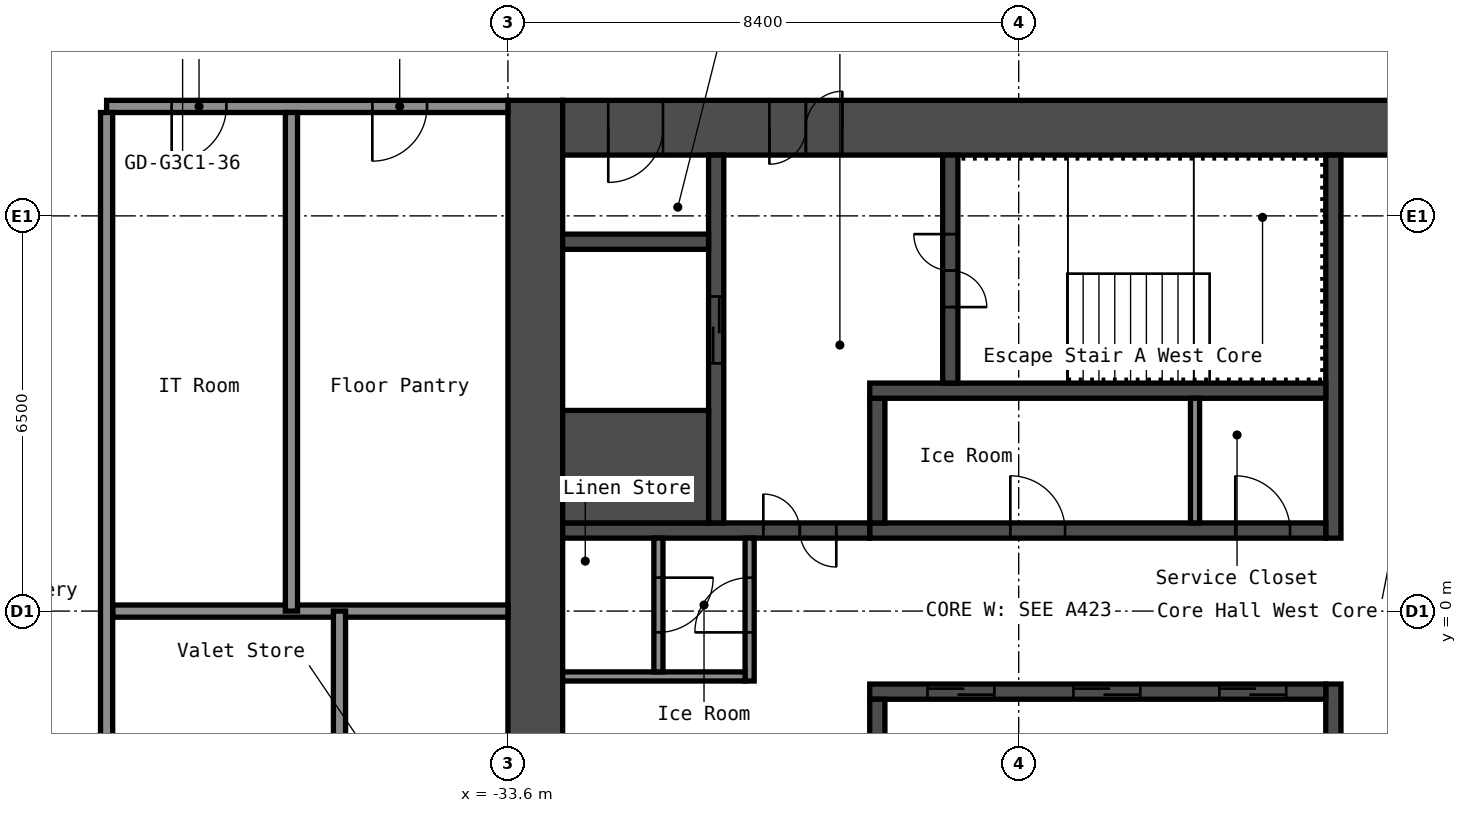
"""IFC4 building model, lengths in metres.
Left out: names, types, materials, properties, quantities, classifications, styles, units other than length and angle.
Written with IfcOpenShell. Run it as: python <this file> out.ifc"""

import sys

from ifc_helpers import new_model, si_unit, direction, frame, frame_2d, origin, place, context, subcontext, project, spatial, rectangle, extrude, element, fill, save


model = new_model("IFC4")
c1 = context("Model", 3, precision=1e-05, world=origin(), true_north=direction((0.0, 1.0)))
c2 = subcontext(c1, "Body", "Model", "MODEL_VIEW")
j1 = project(units=[si_unit("LENGTHUNIT", "METRE"), si_unit("PLANEANGLEUNIT", "RADIAN")], contexts=[c1])
p1 = place(None, origin())
s1 = spatial("IfcSite", under=j1, at=p1, CompositionType="ELEMENT")
p2 = place(p1, origin())
s2 = spatial("IfcBuilding", under=s1, at=p2, CompositionType="ELEMENT")
p3 = place(p2, frame((0.0, 0.0, 153.4)))
s3 = spatial("IfcBuildingStorey", under=s2, at=p3, CompositionType="ELEMENT", Elevation=153.4)
p4 = place(p3, frame((-33.15, -8.4, 0.0), z_axis=(0.0, 0.0, 1.0), x_axis=(0.0, 1.0, 0.0)))
e1 = element("IfcWall", 1, at=p4, inside=s3, PredefinedType="SHEAR", context=c2, shape_type="SweptSolid", body=[
    extrude(rectangle(XDim=16.8, YDim=0.9, at=frame_2d((8.4, 0.0))), origin(), (0.0, 0.0, 1.0), 2.75),
])
p5 = place(p3, frame((-32.7, 7.95, 0.0), z_axis=(0.0, 0.0, 1.0), x_axis=(1.0, 0.0, 0.0)))
e2 = element("IfcWall", 2, at=p5, inside=s3, PredefinedType="SHEAR", context=c2, shape_type="SweptSolid", body=[
    extrude(rectangle(XDim=15.0, YDim=0.9, at=frame_2d((7.5, 0.0))), origin(), (0.0, 0.0, 1.0), 2.75),
])
p6 = place(p5, frame((3.4, 0.0, 0.0)))
e3 = element("IfcOpeningElement", 3, at=p6, cuts=e2, PredefinedType="OPENING", context=c2, shape_type="SweptSolid", body=[
    extrude(rectangle(XDim=1.2, YDim=2.1, at=frame_2d((0.6, 1.05))), frame((0.0, 0.46, 0.0), z_axis=(0.0, -1.0, 0.0), x_axis=(1.0, 0.0, 0.0)), (0.0, 0.0, 1.0), 0.92),
])
p7 = place(p5, frame((0.75, 0.0, 0.0)))
e4 = element("IfcOpeningElement", 4, at=p7, cuts=e2, PredefinedType="OPENING", context=c2, shape_type="SweptSolid", body=[
    extrude(rectangle(XDim=0.9, YDim=2.1, at=frame_2d((0.45, 1.05))), frame((0.0, 0.46, 0.0), z_axis=(0.0, -1.0, 0.0), x_axis=(1.0, 0.0, 0.0)), (0.0, 0.0, 1.0), 0.92),
])
p8 = place(p3, frame((-20.025, 1.2, 0.0), z_axis=(0.0, 0.0, 1.0), x_axis=(0.0, 1.0, 0.0)))
e5 = element("IfcWall", 5, at=p8, inside=s3, PredefinedType="SHEAR", context=c2, shape_type="SweptSolid", body=[
    extrude(rectangle(XDim=6.3, YDim=0.25, at=frame_2d((3.15, 0.0))), origin(), (0.0, 0.0, 1.0), 2.75),
])
p9 = place(p3, frame((-20.025, -7.5, 0.0), z_axis=(0.0, 0.0, 1.0), x_axis=(0.0, 1.0, 0.0)))
e6 = element("IfcWall", 6, at=p9, inside=s3, PredefinedType="SHEAR", context=c2, shape_type="SweptSolid", body=[
    extrude(rectangle(XDim=6.3, YDim=0.25, at=frame_2d((3.15, 0.0))), origin(), (0.0, 0.0, 1.0), 2.75),
])
p10 = place(p9, frame((2.4, 0.0, 0.0)))
e7 = element("IfcOpeningElement", 7, at=p10, cuts=e6, PredefinedType="OPENING", context=c2, shape_type="SweptSolid", body=[
    extrude(rectangle(XDim=1.0, YDim=2.1, at=frame_2d((0.5, 1.05))), frame((0.0, 0.135, 0.0), z_axis=(0.0, -1.0, 0.0), x_axis=(1.0, 0.0, 0.0)), (0.0, 0.0, 1.0), 0.27),
])
p11 = place(p3, frame((-27.65, 1.325, 0.0), z_axis=(0.0, 0.0, 1.0), x_axis=(1.0, 0.0, 0.0)))
e8 = element("IfcWall", 8, at=p11, inside=s3, PredefinedType="SHEAR", context=c2, shape_type="SweptSolid", body=[
    extrude(rectangle(XDim=7.5, YDim=0.25, at=frame_2d((3.75, 0.0))), origin(), (0.0, 0.0, 1.0), 2.75),
])
p12 = place(p11, frame((6.012, 0.0, 0.0)))
e9 = element("IfcOpeningElement", 9, at=p12, cuts=e8, PredefinedType="OPENING", context=c2, shape_type="SweptSolid", body=[
    extrude(rectangle(XDim=0.9, YDim=2.1, at=frame_2d((0.45, 1.05))), frame((0.0, 0.135, 0.0), z_axis=(0.0, -1.0, 0.0), x_axis=(1.0, 0.0, 0.0)), (0.0, 0.0, 1.0), 0.27),
])
p13 = place(p11, frame((2.312, 0.0, 0.0)))
e10 = element("IfcOpeningElement", 10, at=p13, cuts=e8, PredefinedType="OPENING", context=c2, shape_type="SweptSolid", body=[
    extrude(rectangle(XDim=0.9, YDim=2.1, at=frame_2d((0.45, 1.05))), frame((0.0, 0.135, 0.0), z_axis=(0.0, -1.0, 0.0), x_axis=(1.0, 0.0, 0.0)), (0.0, 0.0, 1.0), 0.27),
])
p14 = place(p3, frame((-27.525, 1.45, 0.0), z_axis=(0.0, 0.0, 1.0), x_axis=(0.0, 1.0, 0.0)))
e11 = element("IfcWall", 11, at=p14, inside=s3, PredefinedType="SHEAR", context=c2, shape_type="SweptSolid", body=[
    extrude(rectangle(XDim=2.05, YDim=0.25, at=frame_2d((1.025, 0.0))), origin(), (0.0, 0.0, 1.0), 2.75),
])
p15 = place(p3, frame((-27.65, 3.625, 0.0), z_axis=(0.0, 0.0, 1.0), x_axis=(1.0, 0.0, 0.0)))
e12 = element("IfcWall", 12, at=p15, inside=s3, PredefinedType="SHEAR", context=c2, shape_type="SweptSolid", body=[
    extrude(rectangle(XDim=7.5, YDim=0.25, at=frame_2d((3.75, 0.0))), origin(), (0.0, 0.0, 1.0), 2.75),
])
p16 = place(p3, frame((-26.325, 3.75, 0.0), z_axis=(0.0, 0.0, 1.0), x_axis=(0.0, 1.0, 0.0)))
e13 = element("IfcWall", 13, at=p16, inside=s3, PredefinedType="SHEAR", context=c2, shape_type="SweptSolid", body=[
    extrude(rectangle(XDim=3.75, YDim=0.25, at=frame_2d((1.875, 0.0))), origin(), (0.0, 0.0, 1.0), 2.75),
])
p17 = place(p16, frame((1.25, 0.0, 0.0)))
e14 = element("IfcOpeningElement", 14, at=p17, cuts=e13, PredefinedType="OPENING", context=c2, shape_type="SweptSolid", body=[
    extrude(rectangle(XDim=1.2, YDim=2.1, at=frame_2d((0.6, 1.05))), frame((0.0, 0.135, 0.0), z_axis=(0.0, -1.0, 0.0), x_axis=(1.0, 0.0, 0.0)), (0.0, 0.0, 1.0), 0.27),
])
p18 = place(p3, frame((-32.7, 1.325, 0.0), z_axis=(0.0, 0.0, 1.0), x_axis=(1.0, 0.0, 0.0)))
e15 = element("IfcWall", 15, at=p18, inside=s3, PredefinedType="SHEAR", context=c2, shape_type="SweptSolid", body=[
    extrude(rectangle(XDim=5.05, YDim=0.25, at=frame_2d((2.525, 0.0))), origin(), (0.0, 0.0, 1.0), 2.75),
])
p19 = place(p18, frame((3.3, 0.0, 0.0)))
e16 = element("IfcOpeningElement", 16, at=p19, cuts=e15, PredefinedType="OPENING", context=c2, shape_type="SweptSolid", body=[
    extrude(rectangle(XDim=1.2, YDim=2.1, at=frame_2d((0.6, 1.05))), frame((0.0, 0.135, 0.0), z_axis=(0.0, -1.0, 0.0), x_axis=(1.0, 0.0, 0.0)), (0.0, 0.0, 1.0), 0.27),
])
p20 = place(p3, frame((-30.175, 1.45, 0.0), z_axis=(0.0, 0.0, 1.0), x_axis=(0.0, 1.0, 0.0)))
e17 = element("IfcWall", 17, at=p20, inside=s3, PredefinedType="SHEAR", context=c2, shape_type="SweptSolid", body=[
    extrude(rectangle(XDim=6.05, YDim=0.25, at=frame_2d((3.025, 0.0))), origin(), (0.0, 0.0, 1.0), 2.75),
])
p21 = place(p20, frame((2.625, 0.0, 0.0)))
e18 = element("IfcOpeningElement", 18, at=p21, cuts=e17, PredefinedType="OPENING", context=c2, shape_type="SweptSolid", body=[
    extrude(rectangle(XDim=1.1, YDim=2.1, at=frame_2d((0.55, 1.05))), frame((0.0, 0.135, 0.0), z_axis=(0.0, -1.0, 0.0), x_axis=(1.0, 0.0, 0.0)), (0.0, 0.0, 1.0), 0.27),
])
p22 = place(p3, frame((-32.7, 2.375, 0.0), z_axis=(0.0, 0.0, 1.0), x_axis=(1.0, 0.0, 0.0)))
e19 = element("IfcWall", 19, at=p22, inside=s3, PredefinedType="SHEAR", context=c2, shape_type="SweptSolid", body=[
    extrude(rectangle(XDim=2.4, YDim=1.85, at=frame_2d((1.2, 0.0))), origin(), (0.0, 0.0, 1.0), 2.75),
])
p23 = place(p3, frame((-32.7, 6.075, 0.0), z_axis=(0.0, 0.0, 1.0), x_axis=(1.0, 0.0, 0.0)))
e20 = element("IfcWall", 20, at=p23, inside=s3, PredefinedType="SHEAR", context=c2, shape_type="SweptSolid", body=[
    extrude(rectangle(XDim=2.4, YDim=0.25, at=frame_2d((1.2, 0.0))), origin(), (0.0, 0.0, 1.0), 2.75),
])
p24 = place(p3, frame((-27.65, -1.325, 0.0), z_axis=(0.0, 0.0, 1.0), x_axis=(1.0, 0.0, 0.0)))
e21 = element("IfcWall", 21, at=p24, inside=s3, PredefinedType="SHEAR", context=c2, shape_type="SweptSolid", body=[
    extrude(rectangle(XDim=7.5, YDim=0.25, at=frame_2d((3.75, 0.0))), origin(), (0.0, 0.0, 1.0), 2.75),
])
p25 = place(p24, frame((5.75, 0.0, 0.0)))
e22 = element("IfcOpeningElement", 22, at=p25, cuts=e21, PredefinedType="OPENING", context=c2, shape_type="SweptSolid", body=[
    extrude(rectangle(XDim=1.1, YDim=2.1, at=frame_2d((0.55, 1.05))), frame((0.0, 0.135, 0.0), z_axis=(0.0, -1.0, 0.0), x_axis=(1.0, 0.0, 0.0)), (0.0, 0.0, 1.0), 0.27),
])
p26 = place(p24, frame((3.35, 0.0, 0.0)))
e23 = element("IfcOpeningElement", 23, at=p26, cuts=e21, PredefinedType="OPENING", context=c2, shape_type="SweptSolid", body=[
    extrude(rectangle(XDim=1.1, YDim=2.1, at=frame_2d((0.55, 1.05))), frame((0.0, 0.135, 0.0), z_axis=(0.0, -1.0, 0.0), x_axis=(1.0, 0.0, 0.0)), (0.0, 0.0, 1.0), 0.27),
])
p27 = place(p24, frame((0.95, 0.0, 0.0)))
e24 = element("IfcOpeningElement", 24, at=p27, cuts=e21, PredefinedType="OPENING", context=c2, shape_type="SweptSolid", body=[
    extrude(rectangle(XDim=1.1, YDim=2.1, at=frame_2d((0.55, 1.05))), frame((0.0, 0.135, 0.0), z_axis=(0.0, -1.0, 0.0), x_axis=(1.0, 0.0, 0.0)), (0.0, 0.0, 1.0), 0.27),
])
p28 = place(p3, frame((-27.525, -3.5, 0.0), z_axis=(0.0, 0.0, 1.0), x_axis=(0.0, 1.0, 0.0)))
e25 = element("IfcWall", 25, at=p28, inside=s3, PredefinedType="SHEAR", context=c2, shape_type="SweptSolid", body=[
    extrude(rectangle(XDim=2.05, YDim=0.25, at=frame_2d((1.025, 0.0))), origin(), (0.0, 0.0, 1.0), 2.75),
])
p29 = place(p3, frame((-29.625, -1.15, 0.0), z_axis=(0.0, 0.0, 1.0), x_axis=(0.0, 1.0, 0.0)))
e26 = element("IfcWall", 26, at=p29, inside=s3, PredefinedType="PARTITIONING", context=c2, shape_type="SweptSolid", body=[
    extrude(rectangle(XDim=2.35, YDim=0.15, at=frame_2d((1.175, 0.0))), origin(), (0.0, 0.0, 1.0), 2.75),
])
p30 = place(p29, frame((0.8, 0.0, 0.0)))
e27 = element("IfcOpeningElement", 27, at=p30, cuts=e26, PredefinedType="OPENING", context=c2, shape_type="SweptSolid", body=[
    extrude(rectangle(XDim=0.9, YDim=2.1, at=frame_2d((0.45, 1.05))), frame((0.0, 0.085, 0.0), z_axis=(0.0, -1.0, 0.0), x_axis=(1.0, 0.0, 0.0)), (0.0, 0.0, 1.0), 0.17),
])
p31 = place(p3, frame((-32.7, -1.075, 0.0), z_axis=(0.0, 0.0, 1.0), x_axis=(1.0, 0.0, 0.0)))
e28 = element("IfcWall", 28, at=p31, inside=s3, PredefinedType="PARTITIONING", context=c2, shape_type="SweptSolid", body=[
    extrude(rectangle(XDim=3.0, YDim=0.15, at=frame_2d((1.5, 0.0))), origin(), (0.0, 0.0, 1.0), 2.75),
])
p32 = place(p3, frame((-31.125, -1.0, 0.0), z_axis=(0.0, 0.0, 1.0), x_axis=(0.0, 1.0, 0.0)))
e29 = element("IfcWall", 29, at=p32, inside=s3, PredefinedType="PARTITIONING", context=c2, shape_type="SweptSolid", body=[
    extrude(rectangle(XDim=2.2, YDim=0.15, at=frame_2d((1.1, 0.0))), origin(), (0.0, 0.0, 1.0), 2.75),
])
p33 = place(p32, frame((0.65, 0.0, 0.0)))
e30 = element("IfcOpeningElement", 30, at=p33, cuts=e29, PredefinedType="OPENING", context=c2, shape_type="SweptSolid", body=[
    extrude(rectangle(XDim=0.9, YDim=2.1, at=frame_2d((0.45, 1.05))), frame((0.0, 0.085, 0.0), z_axis=(0.0, -1.0, 0.0), x_axis=(1.0, 0.0, 0.0)), (0.0, 0.0, 1.0), 0.17),
])
p34 = place(p3, frame((-22.3, 1.45, 0.0), z_axis=(0.0, 0.0, 1.0), x_axis=(0.0, 1.0, 0.0)))
e31 = element("IfcWall", 31, at=p34, inside=s3, PredefinedType="PARTITIONING", context=c2, shape_type="SweptSolid", body=[
    extrude(rectangle(XDim=2.05, YDim=0.15, at=frame_2d((1.025, 0.0))), origin(), (0.0, 0.0, 1.0), 2.75),
])
p35 = place(p3, frame((-40.1, 0.0, 0.0), z_axis=(0.0, 0.0, 1.0), x_axis=(1.0, 0.0, 0.0)))
e32 = element("IfcWall", 32, at=p35, inside=s3, PredefinedType="PARTITIONING", context=c2, shape_type="SweptSolid", body=[
    extrude(rectangle(XDim=6.5, YDim=0.2, at=frame_2d((3.25, 0.0))), origin(), (0.0, 0.0, 1.0), 2.75),
])
p36 = place(p3, frame((-40.2, 8.3, 0.0), z_axis=(0.0, 0.0, 1.0), x_axis=(1.0, 0.0, 0.0)))
e33 = element("IfcWall", 33, at=p36, inside=s3, PredefinedType="PARTITIONING", context=c2, shape_type="SweptSolid", body=[
    extrude(rectangle(XDim=6.6, YDim=0.2, at=frame_2d((3.3, 0.0))), origin(), (0.0, 0.0, 1.0), 2.75),
])
p37 = place(p36, frame((1.07, 0.0, 0.0)))
e34 = element("IfcOpeningElement", 34, at=p37, cuts=e33, PredefinedType="OPENING", context=c2, shape_type="SweptSolid", body=[
    extrude(rectangle(XDim=0.9, YDim=2.1, at=frame_2d((0.45, 1.05))), frame((0.0, 0.11, 0.0), z_axis=(0.0, -1.0, 0.0), x_axis=(1.0, 0.0, 0.0)), (0.0, 0.0, 1.0), 0.22),
])
p38 = place(p36, frame((4.37, 0.0, 0.0)))
e35 = element("IfcOpeningElement", 35, at=p38, cuts=e33, PredefinedType="OPENING", context=c2, shape_type="SweptSolid", body=[
    extrude(rectangle(XDim=0.9, YDim=2.1, at=frame_2d((0.45, 1.05))), frame((0.0, 0.11, 0.0), z_axis=(0.0, -1.0, 0.0), x_axis=(1.0, 0.0, 0.0)), (0.0, 0.0, 1.0), 0.22),
])
p39 = place(p3, frame((-40.2, -8.2, 0.0), z_axis=(0.0, 0.0, 1.0), x_axis=(0.0, 1.0, 0.0)))
e36 = element("IfcWall", 36, at=p39, inside=s3, PredefinedType="PARTITIONING", context=c2, shape_type="SweptSolid", body=[
    extrude(rectangle(XDim=16.4, YDim=0.2, at=frame_2d((8.2, 0.0))), origin(), (0.0, 0.0, 1.0), 2.75),
])
for number, where, z_axis, x_axis in (
    (37, (-37.16, 0.0, 0.0), (0.0, 0.0, 1.0), (0.0, 1.0, 0.0)),
    (38, (-36.37, -8.2, 0.0), (0.0, 0.0, 1.0), (0.0, 1.0, 0.0)),
):
    element("IfcWall", number, at=place(p3, frame(where, z_axis=z_axis, x_axis=x_axis)), inside=s3, PredefinedType="PARTITIONING", context=c2, shape_type="SweptSolid", body=[
        extrude(rectangle(XDim=8.2, YDim=0.2, at=frame_2d((4.1, 0.0))), origin(), (0.0, 0.0, 1.0), 2.75),
    ])
p40 = place(p6, origin())
e39 = element("IfcDoor", 39, at=p40, inside=s3, OperationType="DOUBLE_DOOR_SINGLE_SWING", PredefinedType="DOOR", context=c2, shape_type="SweptSolid", body=[
    extrude(rectangle(XDim=1.2, YDim=2.1, at=frame_2d((0.6, 1.05))), frame((0.0, 0.025, 0.0), z_axis=(0.0, -1.0, 0.0), x_axis=(1.0, 0.0, 0.0)), (0.0, 0.0, 1.0), 0.05),
])
fill(e3, e39)
p41 = place(p7, origin())
e40 = element("IfcDoor", 40, at=p41, inside=s3, OperationType="SINGLE_SWING_LEFT", PredefinedType="DOOR", context=c2, shape_type="SweptSolid", body=[
    extrude(rectangle(XDim=0.9, YDim=2.1, at=frame_2d((0.45, 1.05))), frame((0.0, 0.025, 0.0), z_axis=(0.0, -1.0, 0.0), x_axis=(1.0, 0.0, 0.0)), (0.0, 0.0, 1.0), 0.05),
])
fill(e4, e40)
p42 = place(p17, origin())
e41 = element("IfcDoor", 41, at=p42, inside=s3, OperationType="DOUBLE_DOOR_SINGLE_SWING", PredefinedType="DOOR", context=c2, shape_type="SweptSolid", body=[
    extrude(rectangle(XDim=1.2, YDim=2.1, at=frame_2d((0.6, 1.05))), frame((0.0, 0.025, 0.0), z_axis=(0.0, -1.0, 0.0), x_axis=(1.0, 0.0, 0.0)), (0.0, 0.0, 1.0), 0.05),
])
fill(e14, e41)
p43 = place(p19, origin())
e42 = element("IfcDoor", 42, at=p43, inside=s3, OperationType="DOUBLE_DOOR_SINGLE_SWING", PredefinedType="DOOR", context=c2, shape_type="SweptSolid", body=[
    extrude(rectangle(XDim=1.2, YDim=2.1, at=frame_2d((0.6, 1.05))), frame((0.0, 0.025, 0.0), z_axis=(0.0, -1.0, 0.0), x_axis=(1.0, 0.0, 0.0)), (0.0, 0.0, 1.0), 0.05),
])
fill(e16, e42)
p44 = place(p30, origin())
e43 = element("IfcDoor", 43, at=p44, inside=s3, OperationType="SINGLE_SWING_RIGHT", PredefinedType="DOOR", context=c2, shape_type="SweptSolid", body=[
    extrude(rectangle(XDim=0.9, YDim=2.1, at=frame_2d((0.45, 1.05))), frame((0.0, 0.025, 0.0), z_axis=(0.0, -1.0, 0.0), x_axis=(1.0, 0.0, 0.0)), (0.0, 0.0, 1.0), 0.05),
])
fill(e27, e43)
p45 = place(p33, origin())
e44 = element("IfcDoor", 44, at=p45, inside=s3, OperationType="SINGLE_SWING_RIGHT", PredefinedType="DOOR", context=c2, shape_type="SweptSolid", body=[
    extrude(rectangle(XDim=0.9, YDim=2.1, at=frame_2d((0.45, 1.05))), frame((0.0, 0.025, 0.0), z_axis=(0.0, -1.0, 0.0), x_axis=(1.0, 0.0, 0.0)), (0.0, 0.0, 1.0), 0.05),
])
fill(e30, e44)
p46 = place(p12, origin())
e45 = element("IfcDoor", 45, at=p46, inside=s3, OperationType="SINGLE_SWING_RIGHT", PredefinedType="DOOR", context=c2, shape_type="SweptSolid", body=[
    extrude(rectangle(XDim=0.9, YDim=2.1, at=frame_2d((0.45, 1.05))), frame((0.0, 0.025, 0.0), z_axis=(0.0, -1.0, 0.0), x_axis=(1.0, 0.0, 0.0)), (0.0, 0.0, 1.0), 0.05),
])
fill(e9, e45)
p47 = place(p13, origin())
e46 = element("IfcDoor", 46, at=p47, inside=s3, OperationType="SINGLE_SWING_RIGHT", PredefinedType="DOOR", context=c2, shape_type="SweptSolid", body=[
    extrude(rectangle(XDim=0.9, YDim=2.1, at=frame_2d((0.45, 1.05))), frame((0.0, 0.025, 0.0), z_axis=(0.0, -1.0, 0.0), x_axis=(1.0, 0.0, 0.0)), (0.0, 0.0, 1.0), 0.05),
])
fill(e10, e46)
p48 = place(p25, origin())
e47 = element("IfcDoor", 47, at=p48, inside=s3, OperationType="DOUBLE_DOOR_SLIDING", PredefinedType="DOOR", context=c2, shape_type="SweptSolid", body=[
    extrude(rectangle(XDim=1.1, YDim=2.1, at=frame_2d((0.55, 1.05))), frame((0.0, 0.025, 0.0), z_axis=(0.0, -1.0, 0.0), x_axis=(1.0, 0.0, 0.0)), (0.0, 0.0, 1.0), 0.05),
])
fill(e22, e47)
p49 = place(p26, origin())
e48 = element("IfcDoor", 48, at=p49, inside=s3, OperationType="DOUBLE_DOOR_SLIDING", PredefinedType="DOOR", context=c2, shape_type="SweptSolid", body=[
    extrude(rectangle(XDim=1.1, YDim=2.1, at=frame_2d((0.55, 1.05))), frame((0.0, 0.025, 0.0), z_axis=(0.0, -1.0, 0.0), x_axis=(1.0, 0.0, 0.0)), (0.0, 0.0, 1.0), 0.05),
])
fill(e23, e48)
p50 = place(p27, origin())
e49 = element("IfcDoor", 49, at=p50, inside=s3, OperationType="DOUBLE_DOOR_SLIDING", PredefinedType="DOOR", context=c2, shape_type="SweptSolid", body=[
    extrude(rectangle(XDim=1.1, YDim=2.1, at=frame_2d((0.55, 1.05))), frame((0.0, 0.025, 0.0), z_axis=(0.0, -1.0, 0.0), x_axis=(1.0, 0.0, 0.0)), (0.0, 0.0, 1.0), 0.05),
])
fill(e24, e49)
p51 = place(p21, origin())
e50 = element("IfcDoor", 50, at=p51, inside=s3, OperationType="DOUBLE_DOOR_SLIDING", PredefinedType="DOOR", context=c2, shape_type="SweptSolid", body=[
    extrude(rectangle(XDim=1.1, YDim=2.1, at=frame_2d((0.55, 1.05))), frame((0.0, 0.025, 0.0), z_axis=(0.0, -1.0, 0.0), x_axis=(1.0, 0.0, 0.0)), (0.0, 0.0, 1.0), 0.05),
])
fill(e18, e50)
p52 = place(p37, origin())
e51 = element("IfcDoor", 51, at=p52, inside=s3, OperationType="SINGLE_SWING_LEFT", PredefinedType="DOOR", context=c2, shape_type="SweptSolid", body=[
    extrude(rectangle(XDim=0.9, YDim=2.1, at=frame_2d((0.45, 1.05))), frame((0.0, 0.025, 0.0), z_axis=(0.0, -1.0, 0.0), x_axis=(1.0, 0.0, 0.0)), (0.0, 0.0, 1.0), 0.05),
])
fill(e34, e51)
p53 = place(p38, origin())
e52 = element("IfcDoor", 52, at=p53, inside=s3, OperationType="SINGLE_SWING_LEFT", PredefinedType="DOOR", context=c2, shape_type="SweptSolid", body=[
    extrude(rectangle(XDim=0.9, YDim=2.1, at=frame_2d((0.45, 1.05))), frame((0.0, 0.025, 0.0), z_axis=(0.0, -1.0, 0.0), x_axis=(1.0, 0.0, 0.0)), (0.0, 0.0, 1.0), 0.05),
])
fill(e35, e52)
save(model, sys.argv[1])
